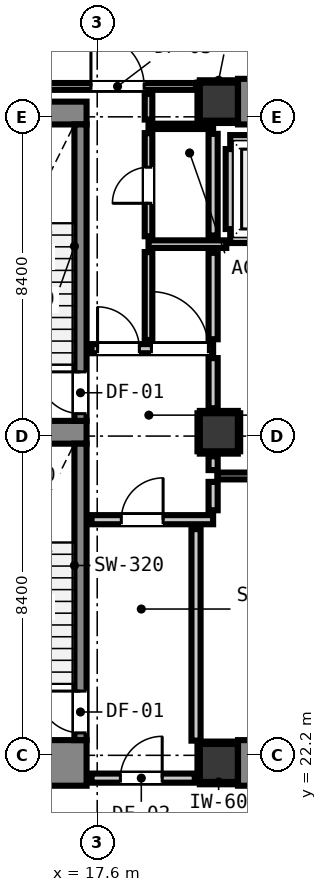
"""IFC4 building model, lengths in metres.
Left out: names, types, materials, properties, quantities, classifications, styles, units other than length and angle.
Written with IfcOpenShell. Run it as: python <this file> out.ifc"""

import sys

from ifc_helpers import new_model, si_unit, direction, frame, frame_2d, origin, origin_2d, place, context, subcontext, project, spatial, rectangle, extrude, element, fill, save


model = new_model("IFC4")
c1 = context("Model", 3, precision=1e-05, world=origin(), true_north=direction((0.0, 1.0)))
c2 = subcontext(c1, "Body", "Model", "MODEL_VIEW")
j1 = project(units=[si_unit("LENGTHUNIT", "METRE"), si_unit("PLANEANGLEUNIT", "RADIAN")], contexts=[c1])
p1 = place(None, origin())
s1 = spatial("IfcSite", under=j1, at=p1, CompositionType="ELEMENT")
p2 = place(p1, origin())
s2 = spatial("IfcBuilding", under=s1, at=p2, CompositionType="ELEMENT")
p3 = place(p2, frame((0.0, 0.0, -8.8)))
s3 = spatial("IfcBuildingStorey", under=s2, at=p3, CompositionType="ELEMENT", Elevation=-8.8)
for number, where, z_axis, x_axis in (
    (1, (20.8, 22.0, 0.0), (0.0, 0.0, 1.0), (1.0, 0.0, 0.0)),
    (2, (20.8, 39.4, 0.0), (0.0, 0.0, 1.0), (1.0, 0.0, 0.0)),
):
    element("IfcColumn", number, at=place(p3, frame(where, z_axis=z_axis, x_axis=x_axis)), inside=s3, PredefinedType="COLUMN", context=c2, shape_type="SweptSolid", body=[
        extrude(rectangle(XDim=1.0, YDim=1.0, at=origin_2d()), origin(), (0.0, 0.0, 1.0), 4.4),
    ])
p4 = place(p3, frame((13.24, 22.0, 0.0), z_axis=(0.0, 0.0, 1.0), x_axis=(1.0, 0.0, 0.0)))
e3 = element("IfcWall", 3, at=p4, inside=s3, PredefinedType="SHEAR", context=c2, shape_type="SweptSolid", body=[
    extrude(rectangle(XDim=4.08, YDim=1.2, at=frame_2d((2.04, 0.0))), origin(), (0.0, 0.0, 1.0), 4.4),
])
p5 = place(p3, frame((13.24, 39.1, 0.0), z_axis=(0.0, 0.0, 1.0), x_axis=(1.0, 0.0, 0.0)))
e4 = element("IfcWall", 4, at=p5, inside=s3, PredefinedType="SHEAR", context=c2, shape_type="SweptSolid", body=[
    extrude(rectangle(XDim=4.08, YDim=0.6, at=frame_2d((2.04, 0.0))), origin(), (0.0, 0.0, 1.0), 4.4),
])
p6 = place(p3, frame((13.905, 30.7, 0.0), z_axis=(0.0, 0.0, 1.0), x_axis=(1.0, 0.0, 0.0)))
e5 = element("IfcWall", 5, at=p6, inside=s3, PredefinedType="SHEAR", context=c2, shape_type="SweptSolid", body=[
    extrude(rectangle(XDim=3.415, YDim=0.6, at=frame_2d((1.708, 0.0))), origin(), (0.0, 0.0, 1.0), 4.4),
])
for number, where, z_axis, x_axis in (
    (6, (21.305, 22.0, 0.0), (0.0, 0.0, 1.0), (1.0, 0.0, 0.0)),
    (7, (21.305, 39.4, 0.0), (0.0, 0.0, 1.0), (1.0, 0.0, 0.0)),
):
    element("IfcWall", number, at=place(p3, frame(where, z_axis=z_axis, x_axis=x_axis)), inside=s3, PredefinedType="SHEAR", context=c2, shape_type="SweptSolid", body=[
        extrude(rectangle(XDim=7.39, YDim=1.2, at=frame_2d((3.695, 0.0))), origin(), (0.0, 0.0, 1.0), 4.4),
    ])
p7 = place(p3, frame((17.16, 31.0, 0.0), z_axis=(0.0, 0.0, 1.0), x_axis=(0.0, 1.0, 0.0)))
e8 = element("IfcWall", 8, at=p7, inside=s3, PredefinedType="SHEAR", context=c2, shape_type="SweptSolid", body=[
    extrude(rectangle(XDim=7.8, YDim=0.32, at=frame_2d((3.9, 0.0))), origin(), (0.0, 0.0, 1.0), 4.4),
])
p8 = place(p7, frame((0.19, 0.0, 0.0)))
e9 = element("IfcOpeningElement", 9, at=p8, cuts=e8, PredefinedType="OPENING", context=c2, shape_type="SweptSolid", body=[
    extrude(rectangle(XDim=1.1, YDim=2.15, at=frame_2d((0.55, 1.075))), frame((0.0, 0.17, 0.0), z_axis=(0.0, -1.0, 0.0), x_axis=(1.0, 0.0, 0.0)), (0.0, 0.0, 1.0), 0.34),
])
p9 = place(p3, frame((17.16, 22.6, 0.0), z_axis=(0.0, 0.0, 1.0), x_axis=(0.0, 1.0, 0.0)))
e10 = element("IfcWall", 10, at=p9, inside=s3, PredefinedType="SHEAR", context=c2, shape_type="SweptSolid", body=[
    extrude(rectangle(XDim=7.8, YDim=0.32, at=frame_2d((3.9, 0.0))), origin(), (0.0, 0.0, 1.0), 4.4),
])
p10 = place(p9, frame((0.19, 0.0, 0.0)))
e11 = element("IfcOpeningElement", 11, at=p10, cuts=e10, PredefinedType="OPENING", context=c2, shape_type="SweptSolid", body=[
    extrude(rectangle(XDim=1.1, YDim=2.15, at=frame_2d((0.55, 1.075))), frame((0.0, 0.17, 0.0), z_axis=(0.0, -1.0, 0.0), x_axis=(1.0, 0.0, 0.0)), (0.0, 0.0, 1.0), 0.34),
])
p11 = place(p3, frame((20.8, 30.7, 0.0), z_axis=(0.0, 0.0, 1.0), x_axis=(1.0, 0.0, 0.0)))
e12 = element("IfcColumn", 12, at=p11, inside=s3, PredefinedType="COLUMN", context=c2, shape_type="SweptSolid", body=[
    extrude(rectangle(XDim=1.0, YDim=1.0, at=origin_2d()), origin(), (0.0, 0.0, 1.0), 4.4),
])
for number, where, z_axis, x_axis in (
    (13, (21.1, 35.8, 0.0), (0.0, 0.0, 1.0), (1.0, 0.0, 0.0)),
    (14, (21.1, 38.4, 0.0), (0.0, 0.0, 1.0), (1.0, 0.0, 0.0)),
):
    element("IfcWall", number, at=place(p3, frame(where, z_axis=z_axis, x_axis=x_axis)), inside=s3, PredefinedType="PARTITIONING", context=c2, shape_type="SweptSolid", body=[
        extrude(rectangle(XDim=2.2, YDim=0.24, at=frame_2d((1.1, 0.0))), origin(), (0.0, 0.0, 1.0), 4.1),
    ])
p12 = place(p3, frame((21.1, 36.048, 0.0), z_axis=(0.0, 0.0, 1.0), x_axis=(0.0, 1.0, 0.0)))
e15 = element("IfcWall", 15, at=p12, inside=s3, PredefinedType="PARTITIONING", context=c2, shape_type="SweptSolid", body=[
    extrude(rectangle(XDim=2.104, YDim=0.24, at=frame_2d((1.052, 0.0))), origin(), (0.0, 0.0, 1.0), 3.135),
])
p13 = place(p3, frame((17.45, 21.6, 0.0), z_axis=(0.0, 0.0, 1.0), x_axis=(1.0, 0.0, 0.0)))
e16 = element("IfcWall", 16, at=p13, inside=s3, PredefinedType="PARTITIONING", context=c2, shape_type="SweptSolid", body=[
    extrude(rectangle(XDim=2.718, YDim=0.24, at=frame_2d((1.359, 0.0))), origin(), (0.0, 0.0, 1.0), 3.335),
])
p14 = place(p13, frame((0.76, 0.0, 0.0)))
e17 = element("IfcOpeningElement", 17, at=p14, cuts=e16, PredefinedType="OPENING", context=c2, shape_type="SweptSolid", body=[
    extrude(rectangle(XDim=1.1, YDim=2.15, at=frame_2d((0.55, 1.075))), frame((0.0, 0.13, 0.0), z_axis=(0.0, -1.0, 0.0), x_axis=(1.0, 0.0, 0.0)), (0.0, 0.0, 1.0), 0.26),
])
p15 = place(p3, frame((17.45, 28.4, 0.0), z_axis=(0.0, 0.0, 1.0), x_axis=(1.0, 0.0, 0.0)))
e18 = element("IfcWall", 18, at=p15, inside=s3, PredefinedType="PARTITIONING", context=c2, shape_type="SweptSolid", body=[
    extrude(rectangle(XDim=3.2, YDim=0.24, at=frame_2d((1.6, 0.0))), origin(), (0.0, 0.0, 1.0), 4.1),
])
p16 = place(p15, frame((0.784, 0.0, 0.0)))
e19 = element("IfcOpeningElement", 19, at=p16, cuts=e18, PredefinedType="OPENING", context=c2, shape_type="SweptSolid", body=[
    extrude(rectangle(XDim=1.1, YDim=2.15, at=frame_2d((0.55, 1.075))), frame((0.0, 0.13, 0.0), z_axis=(0.0, -1.0, 0.0), x_axis=(1.0, 0.0, 0.0)), (0.0, 0.0, 1.0), 0.26),
])
p17 = place(p3, frame((17.45, 32.9, 0.0), z_axis=(0.0, 0.0, 1.0), x_axis=(1.0, 0.0, 0.0)))
e20 = element("IfcWall", 20, at=p17, inside=s3, PredefinedType="PARTITIONING", context=c2, shape_type="SweptSolid", body=[
    extrude(rectangle(XDim=3.2, YDim=0.24, at=frame_2d((1.6, 0.0))), origin(), (0.0, 0.0, 1.0), 4.1),
])
p18 = place(p17, frame((0.159, 0.0, 0.0)))
e21 = element("IfcOpeningElement", 21, at=p18, cuts=e20, PredefinedType="OPENING", context=c2, shape_type="SweptSolid", body=[
    extrude(rectangle(XDim=1.1, YDim=2.15, at=frame_2d((0.55, 1.075))), frame((0.0, 0.13, 0.0), z_axis=(0.0, -1.0, 0.0), x_axis=(1.0, 0.0, 0.0)), (0.0, 0.0, 1.0), 0.26),
])
p19 = place(p17, frame((1.576, 0.0, 0.0)))
e22 = element("IfcOpeningElement", 22, at=p19, cuts=e20, PredefinedType="OPENING", context=c2, shape_type="SweptSolid", body=[
    extrude(rectangle(XDim=1.5, YDim=2.15, at=frame_2d((0.75, 1.075))), frame((0.0, 0.13, 0.0), z_axis=(0.0, -1.0, 0.0), x_axis=(1.0, 0.0, 0.0)), (0.0, 0.0, 1.0), 0.26),
])
p20 = place(p3, frame((18.95, 35.65, 0.0), z_axis=(0.0, 0.0, 1.0), x_axis=(1.0, 0.0, 0.0)))
e23 = element("IfcWall", 23, at=p20, inside=s3, PredefinedType="PARTITIONING", context=c2, shape_type="SweptSolid", body=[
    extrude(rectangle(XDim=2.046, YDim=0.2, at=frame_2d((1.023, 0.0))), origin(), (0.0, 0.0, 1.0), 4.1),
])
p21 = place(p3, frame((20.76, 29.55, 0.0), z_axis=(0.0, 0.0, 1.0), x_axis=(1.0, 0.0, 0.0)))
e24 = element("IfcWall", 24, at=p21, inside=s3, PredefinedType="PARTITIONING", context=c2, shape_type="SweptSolid", body=[
    extrude(rectangle(XDim=8.48, YDim=0.18, at=frame_2d((4.24, 0.0))), origin(), (0.0, 0.0, 1.0), 3.135),
])
p22 = place(p3, frame((10.4, 39.8, 0.0), z_axis=(0.0, 0.0, 1.0), x_axis=(1.0, 0.0, 0.0)))
e25 = element("IfcWall", 25, at=p22, inside=s3, PredefinedType="PARTITIONING", context=c2, shape_type="SweptSolid", body=[
    extrude(rectangle(XDim=9.798, YDim=0.18, at=frame_2d((4.899, 0.0))), origin(), (0.0, 0.0, 1.0), 3.335),
])
p23 = place(p22, frame((7.035, 0.0, 0.0)))
e26 = element("IfcOpeningElement", 26, at=p23, cuts=e25, PredefinedType="OPENING", context=c2, shape_type="SweptSolid", body=[
    extrude(rectangle(XDim=1.4, YDim=2.15, at=frame_2d((0.7, 1.075))), frame((0.0, 0.1, 0.0), z_axis=(0.0, -1.0, 0.0), x_axis=(1.0, 0.0, 0.0)), (0.0, 0.0, 1.0), 0.2),
])
p24 = place(p22, frame((0.424, 0.0, 0.0)))
e27 = element("IfcOpeningElement", 27, at=p24, cuts=e25, PredefinedType="OPENING", context=c2, shape_type="SweptSolid", body=[
    extrude(rectangle(XDim=1.4, YDim=2.15, at=frame_2d((0.7, 1.075))), frame((0.0, 0.1, 0.0), z_axis=(0.0, -1.0, 0.0), x_axis=(1.0, 0.0, 0.0)), (0.0, 0.0, 1.0), 0.2),
])
p25 = place(p3, frame((18.95, 38.75, 0.0), z_axis=(0.0, 0.0, 1.0), x_axis=(1.0, 0.0, 0.0)))
e28 = element("IfcWall", 28, at=p25, inside=s3, PredefinedType="PARTITIONING", context=c2, shape_type="SweptSolid", body=[
    extrude(rectangle(XDim=1.7, YDim=0.14, at=frame_2d((0.85, 0.0))), origin(), (0.0, 0.0, 1.0), 4.1),
])
p26 = place(p3, frame((20.2, 22.586, 0.0), z_axis=(0.0, 0.0, 1.0), x_axis=(0.0, 1.0, 0.0)))
e29 = element("IfcWall", 29, at=p26, inside=s3, PredefinedType="PARTITIONING", context=c2, shape_type="SweptSolid", body=[
    extrude(rectangle(XDim=5.566, YDim=0.24, at=frame_2d((2.783, 0.0))), origin(), (0.0, 0.0, 1.0), 4.1),
])
p27 = place(p3, frame((20.65, 28.648, 0.0), z_axis=(0.0, 0.0, 1.0), x_axis=(0.0, 1.0, 0.0)))
e30 = element("IfcWall", 30, at=p27, inside=s3, PredefinedType="PARTITIONING", context=c2, shape_type="SweptSolid", body=[
    extrude(rectangle(XDim=0.747, YDim=0.24, at=frame_2d((0.374, 0.0))), origin(), (0.0, 0.0, 1.0), 3.135),
])
p28 = place(p3, frame((20.65, 29.705, 0.0), z_axis=(0.0, 0.0, 1.0), x_axis=(0.0, 1.0, 0.0)))
e31 = element("IfcWall", 31, at=p28, inside=s3, PredefinedType="PARTITIONING", context=c2, shape_type="SweptSolid", body=[
    extrude(rectangle(XDim=0.363, YDim=0.24, at=frame_2d((0.182, 0.0))), origin(), (0.0, 0.0, 1.0), 3.135),
])
p29 = place(p3, frame((20.65, 31.332, 0.0), z_axis=(0.0, 0.0, 1.0), x_axis=(0.0, 1.0, 0.0)))
e32 = element("IfcWall", 32, at=p29, inside=s3, PredefinedType="PARTITIONING", context=c2, shape_type="SweptSolid", body=[
    extrude(rectangle(XDim=1.32, YDim=0.24, at=frame_2d((0.66, 0.0))), origin(), (0.0, 0.0, 1.0), 3.135),
])
p30 = place(p3, frame((20.65, 33.148, 0.0), z_axis=(0.0, 0.0, 1.0), x_axis=(0.0, 1.0, 0.0)))
e33 = element("IfcWall", 33, at=p30, inside=s3, PredefinedType="PARTITIONING", context=c2, shape_type="SweptSolid", body=[
    extrude(rectangle(XDim=2.274, YDim=0.24, at=frame_2d((1.137, 0.0))), origin(), (0.0, 0.0, 1.0), 3.135),
])
p31 = place(p3, frame((20.65, 35.878, 0.0), z_axis=(0.0, 0.0, 1.0), x_axis=(0.0, 1.0, 0.0)))
e34 = element("IfcWall", 34, at=p31, inside=s3, PredefinedType="PARTITIONING", context=c2, shape_type="SweptSolid", body=[
    extrude(rectangle(XDim=2.674, YDim=0.24, at=frame_2d((1.337, 0.0))), origin(), (0.0, 0.0, 1.0), 3.135),
])
p32 = place(p3, frame((18.95, 33.128, 0.0), z_axis=(0.0, 0.0, 1.0), x_axis=(0.0, 1.0, 0.0)))
e35 = element("IfcWall", 35, at=p32, inside=s3, PredefinedType="PARTITIONING", context=c2, shape_type="SweptSolid", body=[
    extrude(rectangle(XDim=2.314, YDim=0.2, at=frame_2d((1.157, 0.0))), origin(), (0.0, 0.0, 1.0), 4.1),
])
p33 = place(p3, frame((18.95, 35.858, 0.0), z_axis=(0.0, 0.0, 1.0), x_axis=(0.0, 1.0, 0.0)))
e36 = element("IfcWall", 36, at=p33, inside=s3, PredefinedType="PARTITIONING", context=c2, shape_type="SweptSolid", body=[
    extrude(rectangle(XDim=2.714, YDim=0.2, at=frame_2d((1.357, 0.0))), origin(), (0.0, 0.0, 1.0), 4.1),
])
p34 = place(p33, frame((0.867, 0.0, 0.0)))
e37 = element("IfcOpeningElement", 37, at=p34, cuts=e36, PredefinedType="OPENING", context=c2, shape_type="SweptSolid", body=[
    extrude(rectangle(XDim=0.95, YDim=2.1, at=frame_2d((0.475, 1.05))), frame((0.0, 0.11, 0.0), z_axis=(0.0, -1.0, 0.0), x_axis=(1.0, 0.0, 0.0)), (0.0, 0.0, 1.0), 0.22),
])
p35 = place(p3, frame((18.95, 38.928, 0.0), z_axis=(0.0, 0.0, 1.0), x_axis=(0.0, 1.0, 0.0)))
e38 = element("IfcWall", 38, at=p35, inside=s3, PredefinedType="PARTITIONING", context=c2, shape_type="SweptSolid", body=[
    extrude(rectangle(XDim=0.674, YDim=0.2, at=frame_2d((0.337, 0.0))), origin(), (0.0, 0.0, 1.0), 4.1),
])
for number, where, z_axis, x_axis in (
    (39, (20.3, 21.468, 0.0), (0.0, 0.0, 1.0), (1.0, 0.0, 0.0)),
    (40, (20.3, 22.532, 0.0), (0.0, 0.0, 1.0), (1.0, 0.0, 0.0)),
):
    element("IfcWall", number, at=place(p3, frame(where, z_axis=z_axis, x_axis=x_axis)), inside=s3, PredefinedType="PARTITIONING", context=c2, shape_type="SweptSolid", body=[
        extrude(rectangle(XDim=0.99, YDim=0.06, at=frame_2d((0.495, 0.0))), origin(), (0.0, 0.0, 1.0), 1.45),
    ])
p36 = place(p3, frame((20.268, 21.5, 0.0), z_axis=(0.0, 0.0, 1.0), x_axis=(0.0, 1.0, 0.0)))
e41 = element("IfcWall", 41, at=p36, inside=s3, PredefinedType="PARTITIONING", context=c2, shape_type="SweptSolid", body=[
    extrude(rectangle(XDim=1.0, YDim=0.06, at=frame_2d((0.5, 0.0))), origin(), (0.0, 0.0, 1.0), 1.45),
])
for number, where, z_axis, x_axis in (
    (42, (20.3, 38.868, 0.0), (0.0, 0.0, 1.0), (1.0, 0.0, 0.0)),
    (43, (20.3, 39.932, 0.0), (0.0, 0.0, 1.0), (1.0, 0.0, 0.0)),
):
    element("IfcWall", number, at=place(p3, frame(where, z_axis=z_axis, x_axis=x_axis)), inside=s3, PredefinedType="PARTITIONING", context=c2, shape_type="SweptSolid", body=[
        extrude(rectangle(XDim=0.99, YDim=0.06, at=frame_2d((0.495, 0.0))), origin(), (0.0, 0.0, 1.0), 1.45),
    ])
for number, where, z_axis, x_axis in (
    (44, (20.268, 38.9, 0.0), (0.0, 0.0, 1.0), (0.0, 1.0, 0.0)),
    (45, (20.3, 30.168, 0.0), (0.0, 0.0, 1.0), (1.0, 0.0, 0.0)),
    (46, (20.3, 31.232, 0.0), (0.0, 0.0, 1.0), (1.0, 0.0, 0.0)),
    (47, (20.268, 30.2, 0.0), (0.0, 0.0, 1.0), (0.0, 1.0, 0.0)),
    (48, (21.332, 30.2, 0.0), (0.0, 0.0, 1.0), (0.0, 1.0, 0.0)),
):
    element("IfcWall", number, at=place(p3, frame(where, z_axis=z_axis, x_axis=x_axis)), inside=s3, PredefinedType="PARTITIONING", context=c2, shape_type="SweptSolid", body=[
        extrude(rectangle(XDim=1.0, YDim=0.06, at=frame_2d((0.5, 0.0))), origin(), (0.0, 0.0, 1.0), 1.45),
    ])
p37 = place(p8, origin())
e49 = element("IfcDoor", 49, at=p37, inside=s3, OperationType="SINGLE_SWING_RIGHT", PredefinedType="DOOR", context=c2, shape_type="SweptSolid", body=[
    extrude(rectangle(XDim=1.1, YDim=2.15, at=frame_2d((0.55, 1.075))), frame((0.0, 0.025, 0.0), z_axis=(0.0, -1.0, 0.0), x_axis=(1.0, 0.0, 0.0)), (0.0, 0.0, 1.0), 0.05),
])
fill(e9, e49)
p38 = place(p10, origin())
e50 = element("IfcDoor", 50, at=p38, inside=s3, OperationType="SINGLE_SWING_RIGHT", PredefinedType="DOOR", context=c2, shape_type="SweptSolid", body=[
    extrude(rectangle(XDim=1.1, YDim=2.15, at=frame_2d((0.55, 1.075))), frame((0.0, 0.025, 0.0), z_axis=(0.0, -1.0, 0.0), x_axis=(1.0, 0.0, 0.0)), (0.0, 0.0, 1.0), 0.05),
])
fill(e11, e50)
p39 = place(p16, origin())
e51 = element("IfcDoor", 51, at=p39, inside=s3, OperationType="SINGLE_SWING_RIGHT", PredefinedType="DOOR", context=c2, shape_type="SweptSolid", body=[
    extrude(rectangle(XDim=1.1, YDim=2.15, at=frame_2d((0.55, 1.075))), frame((0.0, 0.025, 0.0), z_axis=(0.0, -1.0, 0.0), x_axis=(1.0, 0.0, 0.0)), (0.0, 0.0, 1.0), 0.05),
])
fill(e19, e51)
p40 = place(p18, origin())
e52 = element("IfcDoor", 52, at=p40, inside=s3, OperationType="SINGLE_SWING_LEFT", PredefinedType="DOOR", context=c2, shape_type="SweptSolid", body=[
    extrude(rectangle(XDim=1.1, YDim=2.15, at=frame_2d((0.55, 1.075))), frame((0.0, 0.025, 0.0), z_axis=(0.0, -1.0, 0.0), x_axis=(1.0, 0.0, 0.0)), (0.0, 0.0, 1.0), 0.05),
])
fill(e21, e52)
p41 = place(p14, origin())
e53 = element("IfcDoor", 53, at=p41, inside=s3, OperationType="SINGLE_SWING_RIGHT", PredefinedType="DOOR", context=c2, shape_type="SweptSolid", body=[
    extrude(rectangle(XDim=1.1, YDim=2.15, at=frame_2d((0.55, 1.075))), frame((0.0, 0.025, 0.0), z_axis=(0.0, -1.0, 0.0), x_axis=(1.0, 0.0, 0.0)), (0.0, 0.0, 1.0), 0.05),
])
fill(e17, e53)
p42 = place(p23, origin())
e54 = element("IfcDoor", 54, at=p42, inside=s3, OperationType="SINGLE_SWING_LEFT", PredefinedType="DOOR", context=c2, shape_type="SweptSolid", body=[
    extrude(rectangle(XDim=1.4, YDim=2.15, at=frame_2d((0.7, 1.075))), frame((0.0, 0.025, 0.0), z_axis=(0.0, -1.0, 0.0), x_axis=(1.0, 0.0, 0.0)), (0.0, 0.0, 1.0), 0.05),
])
fill(e26, e54)
p43 = place(p19, origin())
e55 = element("IfcDoor", 55, at=p43, inside=s3, OperationType="SINGLE_SWING_LEFT", PredefinedType="DOOR", context=c2, shape_type="SweptSolid", body=[
    extrude(rectangle(XDim=1.5, YDim=2.15, at=frame_2d((0.75, 1.075))), frame((0.0, 0.025, 0.0), z_axis=(0.0, -1.0, 0.0), x_axis=(1.0, 0.0, 0.0)), (0.0, 0.0, 1.0), 0.05),
])
fill(e22, e55)
p44 = place(p34, origin())
e56 = element("IfcDoor", 56, at=p44, inside=s3, OperationType="SINGLE_SWING_LEFT", PredefinedType="DOOR", context=c2, shape_type="SweptSolid", body=[
    extrude(rectangle(XDim=0.95, YDim=2.1, at=frame_2d((0.475, 1.05))), frame((0.0, 0.025, 0.0), z_axis=(0.0, -1.0, 0.0), x_axis=(1.0, 0.0, 0.0)), (0.0, 0.0, 1.0), 0.05),
])
fill(e37, e56)
save(model, sys.argv[1])
